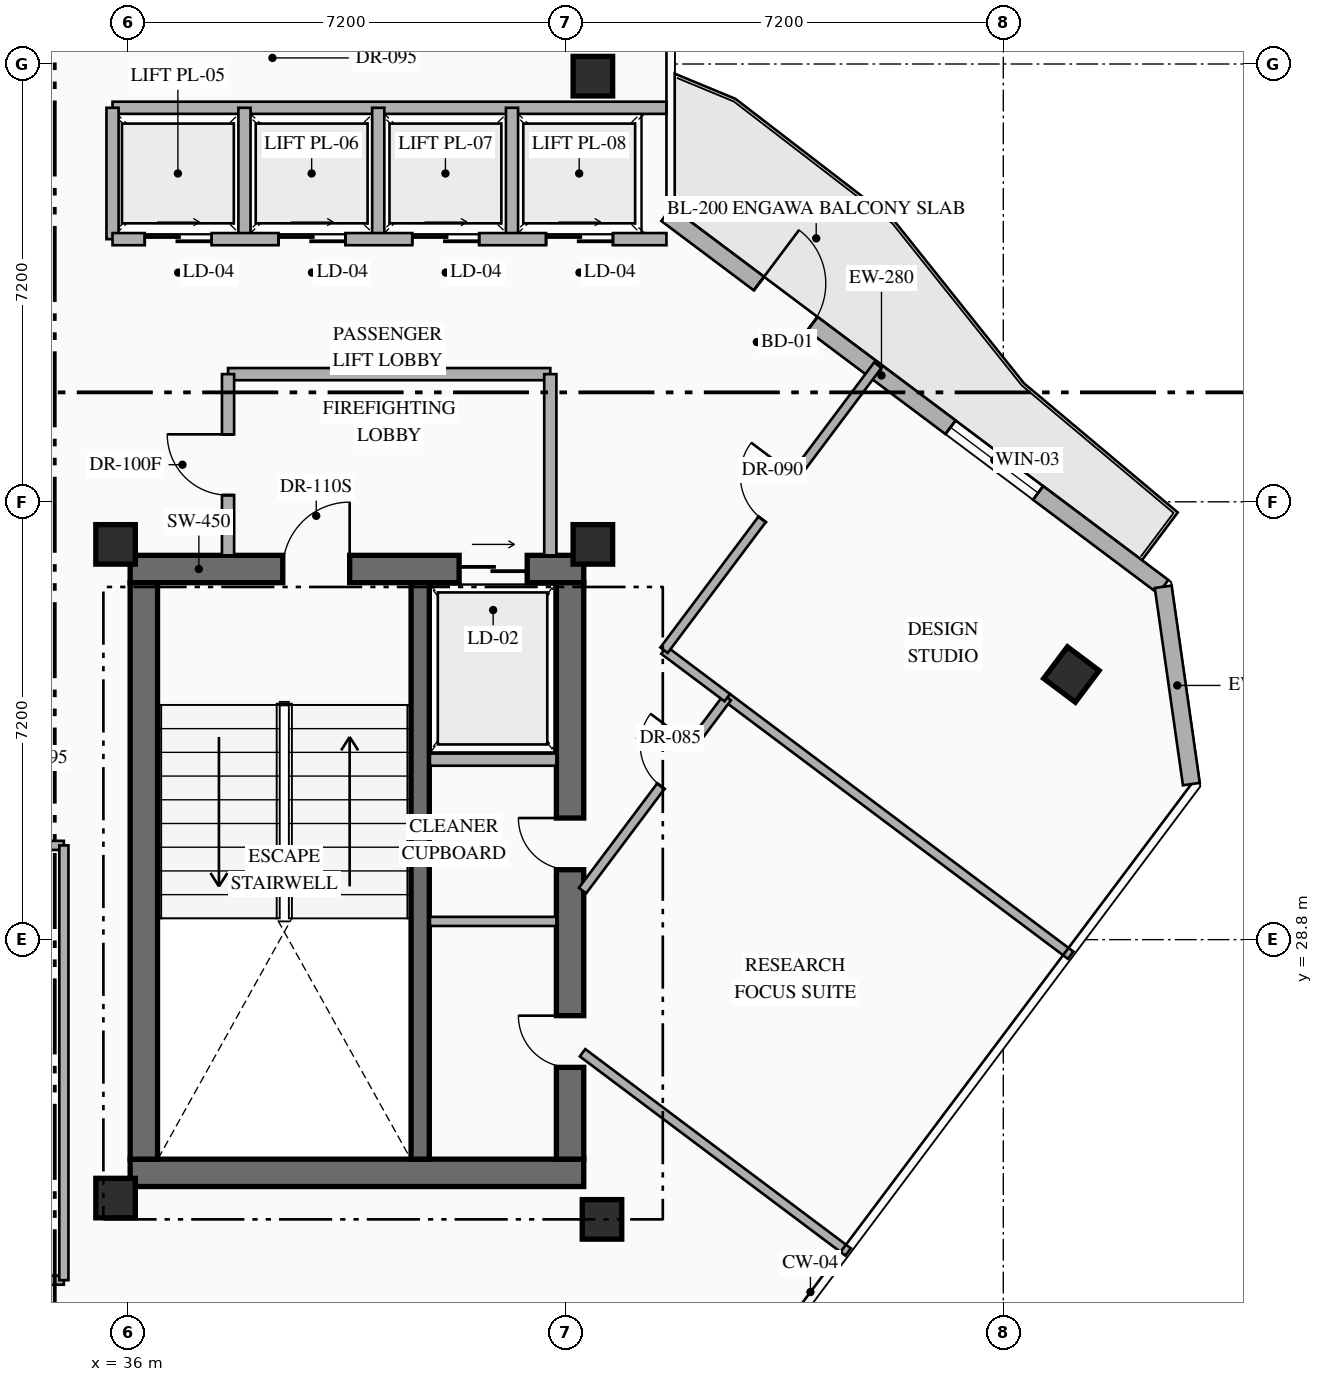
"""IFC4 building model, lengths in metres.
Left out: names, types, materials, properties, quantities, classifications, styles, units other than length and angle.
Written with IfcOpenShell. Run it as: python <this file> out.ifc"""

import sys

from ifc_helpers import new_model, si_unit, direction, frame, frame_2d, origin, origin_2d, place, context, subcontext, project, spatial, rectangle, hollow_rectangle, extrude, element, fill, save


model = new_model("IFC4")
c1 = context("Model", 3, precision=1e-05, world=origin(), true_north=direction((0.0, 1.0)))
c2 = subcontext(c1, "Body", "Model", "MODEL_VIEW")
j1 = project(units=[si_unit("LENGTHUNIT", "METRE"), si_unit("PLANEANGLEUNIT", "RADIAN")], contexts=[c1])
p1 = place(None, origin())
s1 = spatial("IfcSite", under=j1, at=p1, CompositionType="ELEMENT")
p2 = place(p1, origin())
s2 = spatial("IfcBuilding", under=s1, at=p2, CompositionType="ELEMENT")
p3 = place(p2, frame((0.0, 0.0, 243.15)))
s3 = spatial("IfcBuildingStorey", under=s2, at=p3, CompositionType="ELEMENT", Elevation=243.15)
p4 = place(p3, frame((36.04, 24.965, 0.0), z_axis=(0.0, 0.0, 1.0), x_axis=(1.0, 0.0, 0.0)))
e1 = element("IfcWall", 1, at=p4, inside=s3, PredefinedType="SHEAR", context=c2, shape_type="SweptSolid", body=[
    extrude(rectangle(XDim=7.46, YDim=0.45, at=frame_2d((3.73, 0.0))), origin(), (0.0, 0.0, 1.0), 3.6),
])
p5 = place(p3, frame((36.04, 34.895, 0.0), z_axis=(0.0, 0.0, 1.0), x_axis=(1.0, 0.0, 0.0)))
e2 = element("IfcWall", 2, at=p5, inside=s3, PredefinedType="SHEAR", context=c2, shape_type="SweptSolid", body=[
    extrude(rectangle(XDim=7.46, YDim=0.45, at=frame_2d((3.73, 0.0))), origin(), (0.0, 0.0, 1.0), 3.6),
])
p6 = place(p5, frame((2.51, 0.0, 0.0)))
e3 = element("IfcOpeningElement", 3, at=p6, cuts=e2, PredefinedType="OPENING", context=c2, shape_type="SweptSolid", body=[
    extrude(rectangle(XDim=1.1, YDim=2.2, at=frame_2d((0.55, 1.1))), frame((0.0, 0.235, 0.0), z_axis=(0.0, -1.0, 0.0), x_axis=(1.0, 0.0, 0.0)), (0.0, 0.0, 1.0), 0.47),
])
p7 = place(p5, frame((5.41, 0.0, 0.0)))
e4 = element("IfcOpeningElement", 4, at=p7, cuts=e2, PredefinedType="OPENING", context=c2, shape_type="SweptSolid", body=[
    extrude(rectangle(XDim=1.12, YDim=2.15, at=frame_2d((0.56, 1.075))), frame((0.0, 0.235, 0.0), z_axis=(0.0, -1.0, 0.0), x_axis=(1.0, 0.0, 0.0)), (0.0, 0.0, 1.0), 0.47),
])
p8 = place(p3, frame((36.265, 25.19, 0.0), z_axis=(0.0, 0.0, 1.0), x_axis=(0.0, 1.0, 0.0)))
e5 = element("IfcWall", 5, at=p8, inside=s3, PredefinedType="SHEAR", context=c2, shape_type="SweptSolid", body=[
    extrude(rectangle(XDim=9.48, YDim=0.45, at=frame_2d((4.74, 0.0))), origin(), (0.0, 0.0, 1.0), 3.6),
])
p9 = place(p3, frame((43.275, 25.19, 0.0), z_axis=(0.0, 0.0, 1.0), x_axis=(0.0, 1.0, 0.0)))
e6 = element("IfcWall", 6, at=p9, inside=s3, PredefinedType="SHEAR", context=c2, shape_type="SweptSolid", body=[
    extrude(rectangle(XDim=9.48, YDim=0.45, at=frame_2d((4.74, 0.0))), origin(), (0.0, 0.0, 1.0), 3.6),
])
p10 = place(p9, frame((1.51, 0.0, 0.0)))
e7 = element("IfcOpeningElement", 7, at=p10, cuts=e6, PredefinedType="OPENING", context=c2, shape_type="SweptSolid", body=[
    extrude(rectangle(XDim=0.85, YDim=2.08, at=frame_2d((0.425, 1.04))), frame((0.0, 0.235, 0.0), z_axis=(0.0, -1.0, 0.0), x_axis=(1.0, 0.0, 0.0)), (0.0, 0.0, 1.0), 0.47),
])
p11 = place(p9, frame((4.76, 0.0, 0.0)))
e8 = element("IfcOpeningElement", 8, at=p11, cuts=e6, PredefinedType="OPENING", context=c2, shape_type="SweptSolid", body=[
    extrude(rectangle(XDim=0.85, YDim=2.08, at=frame_2d((0.425, 1.04))), frame((0.0, 0.235, 0.0), z_axis=(0.0, -1.0, 0.0), x_axis=(1.0, 0.0, 0.0)), (0.0, 0.0, 1.0), 0.47),
])
p12 = place(p3, frame((40.81, 25.19, 0.0), z_axis=(0.0, 0.0, 1.0), x_axis=(0.0, 1.0, 0.0)))
e9 = element("IfcWall", 9, at=p12, inside=s3, PredefinedType="SHEAR", context=c2, shape_type="SweptSolid", body=[
    extrude(rectangle(XDim=9.48, YDim=0.3, at=frame_2d((4.74, 0.0))), origin(), (0.0, 0.0, 1.0), 3.6),
])
for number, where, z_axis, x_axis in (
    (10, (35.8, 24.55, 0.0), (0.0, 0.0, 1.0), (1.0, 0.0, 0.0)),
    (11, (43.8, 24.2, 0.0), (0.0, 0.0, 1.0), (1.0, 0.0, 0.0)),
    (12, (35.8, 35.3, 0.0), (0.0, 0.0, 1.0), (1.0, 0.0, 0.0)),
    (13, (43.65, 35.3, 0.0), (0.0, 0.0, 1.0), (1.0, 0.0, 0.0)),
    (14, (43.65, 43.0, 0.0), (0.0, 0.0, 1.0), (1.0, 0.0, 0.0)),
    (15, (51.52, 33.16, 0.0), (0.0, 0.0, 1.0), (0.8, -0.6, 0.0)),
):
    element("IfcColumn", number, at=place(p3, frame(where, z_axis=z_axis, x_axis=x_axis)), inside=s3, PredefinedType="COLUMN", context=c2, shape_type="SweptSolid", body=[
        extrude(hollow_rectangle(XDim=0.65, YDim=0.65, WallThickness=0.025, at=origin_2d()), origin(), (0.0, 0.0, 1.0), 3.6),
    ])
p13 = place(p3, frame((44.86, 40.73, 0.0), z_axis=(0.0, 0.0, 1.0), x_axis=(0.800022950109, -0.599969398635, 0.0)))
e16 = element("IfcWall", 16, at=p13, inside=s3, PredefinedType="STANDARD", context=c2, shape_type="SweptSolid", body=[
    extrude(rectangle(XDim=10.212, YDim=0.28, at=frame_2d((5.106, 0.0))), origin(), (0.0, 0.0, 1.0), 3.35),
])
p14 = place(p13, frame((1.901, 0.0, 0.0)))
e17 = element("IfcOpeningElement", 17, at=p14, cuts=e16, PredefinedType="OPENING", context=c2, shape_type="SweptSolid", body=[
    extrude(rectangle(XDim=1.1, YDim=2.2, at=frame_2d((0.55, 1.1))), frame((0.0, 0.15, 0.0), z_axis=(0.0, -1.0, 0.0), x_axis=(1.0, 0.0, 0.0)), (0.0, 0.0, 1.0), 0.3),
])
p15 = place(p13, frame((5.84, 0.0, 0.85)))
e18 = element("IfcOpeningElement", 18, at=p15, cuts=e16, PredefinedType="OPENING", context=c2, shape_type="SweptSolid", body=[
    extrude(rectangle(XDim=1.8, YDim=2.1, at=frame_2d((0.9, 1.05))), frame((0.0, 0.15, 0.0), z_axis=(0.0, -1.0, 0.0), x_axis=(1.0, 0.0, 0.0)), (0.0, 0.0, 1.0), 0.3),
])
p16 = place(p3, frame((53.03, 34.603, 0.0), z_axis=(0.0, 0.0, 1.0), x_axis=(0.141212810973, -0.989979263428, 0.0)))
e19 = element("IfcWall", 19, at=p16, inside=s3, PredefinedType="STANDARD", context=c2, shape_type="SweptSolid", body=[
    extrude(rectangle(XDim=3.278, YDim=0.28, at=frame_2d((1.639, 0.0))), origin(), (0.0, 0.0, 1.0), 3.35),
])
p17 = place(p3, frame((40.97, 31.76, 0.0), z_axis=(0.0, 0.0, 1.0), x_axis=(1.0, 0.0, 0.0)))
e20 = element("IfcWall", 20, at=p17, inside=s3, PredefinedType="STANDARD", context=c2, shape_type="SweptSolid", body=[
    extrude(rectangle(XDim=2.08, YDim=0.2, at=frame_2d((1.04, 0.0))), origin(), (0.0, 0.0, 1.0), 3.35),
])
p18 = place(p3, frame((40.97, 29.1, 0.0), z_axis=(0.0, 0.0, 1.0), x_axis=(1.0, 0.0, 0.0)))
e21 = element("IfcWall", 21, at=p18, inside=s3, PredefinedType="PARTITIONING", context=c2, shape_type="SweptSolid", body=[
    extrude(rectangle(XDim=2.08, YDim=0.15, at=frame_2d((1.04, 0.0))), origin(), (0.0, 0.0, 1.0), 3.35),
])
p19 = place(p3, frame((37.65, 38.1, 0.0), z_axis=(0.0, 0.0, 1.0), x_axis=(1.0, 0.0, 0.0)))
e22 = element("IfcWall", 22, at=p19, inside=s3, PredefinedType="STANDARD", context=c2, shape_type="SweptSolid", body=[
    extrude(rectangle(XDim=5.3, YDim=0.2, at=frame_2d((2.65, 0.0))), origin(), (0.0, 0.0, 1.0), 3.35),
])
p20 = place(p3, frame((42.95, 35.12, 0.0), z_axis=(0.0, 0.0, 1.0), x_axis=(0.0, 1.0, 0.0)))
e23 = element("IfcWall", 23, at=p20, inside=s3, PredefinedType="STANDARD", context=c2, shape_type="SweptSolid", body=[
    extrude(rectangle(XDim=2.98, YDim=0.2, at=frame_2d((1.49, 0.0))), origin(), (0.0, 0.0, 1.0), 3.35),
])
p21 = place(p3, frame((37.65, 35.12, 0.0), z_axis=(0.0, 0.0, 1.0), x_axis=(0.0, 1.0, 0.0)))
e24 = element("IfcWall", 24, at=p21, inside=s3, PredefinedType="STANDARD", context=c2, shape_type="SweptSolid", body=[
    extrude(rectangle(XDim=2.98, YDim=0.2, at=frame_2d((1.49, 0.0))), origin(), (0.0, 0.0, 1.0), 3.35),
])
p22 = place(p21, frame((0.99, 0.0, 0.0)))
e25 = element("IfcOpeningElement", 25, at=p22, cuts=e24, PredefinedType="OPENING", context=c2, shape_type="SweptSolid", body=[
    extrude(rectangle(XDim=1.0, YDim=2.2, at=frame_2d((0.5, 1.1))), frame((0.0, 0.11, 0.0), z_axis=(0.0, -1.0, 0.0), x_axis=(1.0, 0.0, 0.0)), (0.0, 0.0, 1.0), 0.22),
])
p23 = place(p3, frame((35.75, 42.48, 0.0), z_axis=(0.0, 0.0, 1.0), x_axis=(1.0, 0.0, 0.0)))
e26 = element("IfcWall", 26, at=p23, inside=s3, PredefinedType="STANDARD", context=c2, shape_type="SweptSolid", body=[
    extrude(rectangle(XDim=9.11, YDim=0.2, at=frame_2d((4.555, 0.0))), origin(), (0.0, 0.0, 1.0), 3.35),
])
for number, where, z_axis, x_axis in (
    (27, (35.75, 40.32, 0.0), (0.0, 0.0, 1.0), (0.0, 1.0, 0.0)),
    (28, (37.92, 40.32, 0.0), (0.0, 0.0, 1.0), (0.0, 1.0, 0.0)),
    (29, (40.12, 40.32, 0.0), (0.0, 0.0, 1.0), (0.0, 1.0, 0.0)),
    (30, (42.32, 40.32, 0.0), (0.0, 0.0, 1.0), (0.0, 1.0, 0.0)),
):
    element("IfcWall", number, at=place(p3, frame(where, z_axis=z_axis, x_axis=x_axis)), inside=s3, PredefinedType="STANDARD", context=c2, shape_type="SweptSolid", body=[
        extrude(rectangle(XDim=2.16, YDim=0.2, at=frame_2d((1.08, 0.0))), origin(), (0.0, 0.0, 1.0), 3.35),
    ])
p24 = place(p3, frame((35.75, 40.32, 0.0), z_axis=(0.0, 0.0, 1.0), x_axis=(1.0, 0.0, 0.0)))
e31 = element("IfcWall", 31, at=p24, inside=s3, PredefinedType="STANDARD", context=c2, shape_type="SweptSolid", body=[
    extrude(rectangle(XDim=9.11, YDim=0.2, at=frame_2d((4.555, 0.0))), origin(), (0.0, 0.0, 1.0), 3.35),
])
p25 = place(p24, frame((0.53, 0.0, 0.0)))
e32 = element("IfcOpeningElement", 32, at=p25, cuts=e31, PredefinedType="OPENING", context=c2, shape_type="SweptSolid", body=[
    extrude(rectangle(XDim=1.1, YDim=2.18, at=frame_2d((0.55, 1.09))), frame((0.0, 0.11, 0.0), z_axis=(0.0, -1.0, 0.0), x_axis=(1.0, 0.0, 0.0)), (0.0, 0.0, 1.0), 0.22),
])
p26 = place(p24, frame((2.73, 0.0, 0.0)))
e33 = element("IfcOpeningElement", 33, at=p26, cuts=e31, PredefinedType="OPENING", context=c2, shape_type="SweptSolid", body=[
    extrude(rectangle(XDim=1.1, YDim=2.18, at=frame_2d((0.55, 1.09))), frame((0.0, 0.11, 0.0), z_axis=(0.0, -1.0, 0.0), x_axis=(1.0, 0.0, 0.0)), (0.0, 0.0, 1.0), 0.22),
])
p27 = place(p24, frame((4.93, 0.0, 0.0)))
e34 = element("IfcOpeningElement", 34, at=p27, cuts=e31, PredefinedType="OPENING", context=c2, shape_type="SweptSolid", body=[
    extrude(rectangle(XDim=1.1, YDim=2.18, at=frame_2d((0.55, 1.09))), frame((0.0, 0.11, 0.0), z_axis=(0.0, -1.0, 0.0), x_axis=(1.0, 0.0, 0.0)), (0.0, 0.0, 1.0), 0.22),
])
p28 = place(p24, frame((7.13, 0.0, 0.0)))
e35 = element("IfcOpeningElement", 35, at=p28, cuts=e31, PredefinedType="OPENING", context=c2, shape_type="SweptSolid", body=[
    extrude(rectangle(XDim=1.1, YDim=2.18, at=frame_2d((0.55, 1.09))), frame((0.0, 0.11, 0.0), z_axis=(0.0, -1.0, 0.0), x_axis=(1.0, 0.0, 0.0)), (0.0, 0.0, 1.0), 0.22),
])
p29 = place(p3, frame((30.5, 23.2, 0.0), z_axis=(0.0, 0.0, 1.0), x_axis=(1.0, 0.0, 0.0)))
e36 = element("IfcWall", 36, at=p29, inside=s3, PredefinedType="PARTITIONING", context=c2, shape_type="SweptSolid", body=[
    extrude(rectangle(XDim=4.45, YDim=0.15, at=frame_2d((2.225, 0.0))), origin(), (0.0, 0.0, 1.0), 3.35),
])
p30 = place(p3, frame((30.5, 30.35, 0.0), z_axis=(0.0, 0.0, 1.0), x_axis=(1.0, 0.0, 0.0)))
e37 = element("IfcWall", 37, at=p30, inside=s3, PredefinedType="PARTITIONING", context=c2, shape_type="SweptSolid", body=[
    extrude(rectangle(XDim=4.45, YDim=0.15, at=frame_2d((2.225, 0.0))), origin(), (0.0, 0.0, 1.0), 3.35),
])
p31 = place(p30, frame((2.846, 0.0, 0.0)))
e38 = element("IfcOpeningElement", 38, at=p31, cuts=e37, PredefinedType="OPENING", context=c2, shape_type="SweptSolid", body=[
    extrude(rectangle(XDim=0.95, YDim=2.15, at=frame_2d((0.475, 1.075))), frame((0.0, 0.085, 0.0), z_axis=(0.0, -1.0, 0.0), x_axis=(1.0, 0.0, 0.0)), (0.0, 0.0, 1.0), 0.17),
])
p32 = place(p3, frame((34.95, 23.2, 0.0), z_axis=(0.0, 0.0, 1.0), x_axis=(0.0, 1.0, 0.0)))
e39 = element("IfcWall", 39, at=p32, inside=s3, PredefinedType="PARTITIONING", context=c2, shape_type="SweptSolid", body=[
    extrude(rectangle(XDim=7.15, YDim=0.15, at=frame_2d((3.575, 0.0))), origin(), (0.0, 0.0, 1.0), 3.35),
])
p33 = place(p3, frame((43.48, 26.94, 0.0), z_axis=(0.0, 0.0, 1.0), x_axis=(0.80000536583, -0.599992845493, 0.0)))
e40 = element("IfcWall", 40, at=p33, inside=s3, PredefinedType="PARTITIONING", context=c2, shape_type="SweptSolid", body=[
    extrude(rectangle(XDim=5.46, YDim=0.15, at=frame_2d((2.73, 0.0))), origin(), (0.0, 0.0, 1.0), 3.35),
])
p34 = place(p3, frame((45.86, 32.78, 0.0), z_axis=(0.0, 0.0, 1.0), x_axis=(0.799991700537, -0.600011065791, 0.0)))
e41 = element("IfcWall", 41, at=p34, inside=s3, PredefinedType="PARTITIONING", context=c2, shape_type="SweptSolid", body=[
    extrude(rectangle(XDim=7.06, YDim=0.15, at=frame_2d((3.53, 0.0))), origin(), (0.0, 0.0, 1.0), 3.35),
])
p35 = place(p3, frame((43.48, 29.607, 0.0), z_axis=(0.0, 0.0, 1.0), x_axis=(0.600049238723, 0.79996306859, 0.0)))
e42 = element("IfcWall", 42, at=p35, inside=s3, PredefinedType="PARTITIONING", context=c2, shape_type="SweptSolid", body=[
    extrude(rectangle(XDim=3.967, YDim=0.15, at=frame_2d((1.983, 0.0))), origin(), (0.0, 0.0, 1.0), 3.35),
])
p36 = place(p35, frame((2.147, 0.0, 0.0)))
e43 = element("IfcOpeningElement", 43, at=p36, cuts=e42, PredefinedType="OPENING", context=c2, shape_type="SweptSolid", body=[
    extrude(rectangle(XDim=0.85, YDim=2.08, at=frame_2d((0.425, 1.04))), frame((0.0, 0.085, 0.0), z_axis=(0.0, -1.0, 0.0), x_axis=(1.0, 0.0, 0.0)), (0.0, 0.0, 1.0), 0.17),
])
p37 = place(p3, frame((44.82, 33.56, 0.0), z_axis=(0.0, 0.0, 1.0), x_axis=(0.8, -0.6, 0.0)))
e44 = element("IfcWall", 44, at=p37, inside=s3, PredefinedType="PARTITIONING", context=c2, shape_type="SweptSolid", body=[
    extrude(rectangle(XDim=1.3, YDim=0.15, at=frame_2d((0.65, 0.0))), origin(), (0.0, 0.0, 1.0), 3.35),
])
p38 = place(p3, frame((44.82, 33.56, 0.0), z_axis=(0.0, 0.0, 1.0), x_axis=(0.599986667805, 0.800009998972, 0.0)))
e45 = element("IfcWall", 45, at=p38, inside=s3, PredefinedType="PARTITIONING", context=c2, shape_type="SweptSolid", body=[
    extrude(rectangle(XDim=5.86, YDim=0.15, at=frame_2d((2.93, 0.0))), origin(), (0.0, 0.0, 1.0), 3.35),
])
p39 = place(p38, frame((2.69, 0.0, 0.0)))
e46 = element("IfcOpeningElement", 46, at=p39, cuts=e45, PredefinedType="OPENING", context=c2, shape_type="SweptSolid", body=[
    extrude(rectangle(XDim=0.9, YDim=2.15, at=frame_2d((0.45, 1.075))), frame((0.0, 0.085, 0.0), z_axis=(0.0, -1.0, 0.0), x_axis=(1.0, 0.0, 0.0)), (0.0, 0.0, 1.0), 0.17),
])
p40 = place(p3, frame((27.91, 26.68, 0.0), z_axis=(0.0, 0.0, 1.0), x_axis=(0.8, -0.6, 0.0)))
e47 = element("IfcWall", 47, at=p40, inside=s3, PredefinedType="PARTITIONING", context=c2, shape_type="SweptSolid", body=[
    extrude(rectangle(XDim=17.76, YDim=0.15, at=frame_2d((8.88, 0.0))), origin(), (0.0, 0.0, 1.0), 3.35),
])
p41 = place(p40, frame((11.294, 0.0, 0.0)))
e48 = element("IfcOpeningElement", 48, at=p41, cuts=e47, PredefinedType="OPENING", context=c2, shape_type="SweptSolid", body=[
    extrude(rectangle(XDim=0.95, YDim=2.15, at=frame_2d((0.475, 1.075))), frame((0.0, 0.085, 0.0), z_axis=(0.0, -1.0, 0.0), x_axis=(1.0, 0.0, 0.0)), (0.0, 0.0, 1.0), 0.17),
])
p42 = place(p14, origin())
e49 = element("IfcDoor", 49, at=p42, inside=s3, OperationType="SINGLE_SWING_LEFT", PredefinedType="DOOR", context=c2, shape_type="SweptSolid", body=[
    extrude(rectangle(XDim=1.1, YDim=2.2, at=frame_2d((0.55, 1.1))), frame((0.0, 0.025, 0.0), z_axis=(0.0, -1.0, 0.0), x_axis=(1.0, 0.0, 0.0)), (0.0, 0.0, 1.0), 0.05),
])
fill(e17, e49)
p43 = place(p15, origin())
e50 = element("IfcWindow", 50, at=p43, inside=s3, PartitioningType="SINGLE_PANEL", PredefinedType="WINDOW", context=c2, shape_type="SweptSolid", body=[
    extrude(rectangle(XDim=1.8, YDim=2.1, at=frame_2d((0.9, 1.05))), frame((0.0, 0.03, 0.0), z_axis=(0.0, -1.0, 0.0), x_axis=(1.0, 0.0, 0.0)), (0.0, 0.0, 1.0), 0.06),
])
fill(e18, e50)
p44 = place(p6, origin())
e51 = element("IfcDoor", 51, at=p44, inside=s3, OperationType="SINGLE_SWING_RIGHT", PredefinedType="DOOR", context=c2, shape_type="SweptSolid", body=[
    extrude(rectangle(XDim=1.1, YDim=2.2, at=frame_2d((0.55, 1.1))), frame((0.0, 0.025, 0.0), z_axis=(0.0, -1.0, 0.0), x_axis=(1.0, 0.0, 0.0)), (0.0, 0.0, 1.0), 0.05),
])
fill(e3, e51)
p45 = place(p7, origin())
e52 = element("IfcDoor", 52, at=p45, inside=s3, OperationType="SLIDING_TO_RIGHT", PredefinedType="USERDEFINED", context=c2, shape_type="SweptSolid", body=[
    extrude(rectangle(XDim=1.12, YDim=2.15, at=frame_2d((0.56, 1.075))), frame((0.0, 0.025, 0.0), z_axis=(0.0, -1.0, 0.0), x_axis=(1.0, 0.0, 0.0)), (0.0, 0.0, 1.0), 0.05),
])
fill(e4, e52)
p46 = place(p10, origin())
e53 = element("IfcDoor", 53, at=p46, inside=s3, OperationType="SINGLE_SWING_RIGHT", PredefinedType="DOOR", context=c2, shape_type="SweptSolid", body=[
    extrude(rectangle(XDim=0.85, YDim=2.08, at=frame_2d((0.425, 1.04))), frame((0.0, 0.025, 0.0), z_axis=(0.0, -1.0, 0.0), x_axis=(1.0, 0.0, 0.0)), (0.0, 0.0, 1.0), 0.05),
])
fill(e7, e53)
p47 = place(p11, origin())
e54 = element("IfcDoor", 54, at=p47, inside=s3, OperationType="SINGLE_SWING_RIGHT", PredefinedType="DOOR", context=c2, shape_type="SweptSolid", body=[
    extrude(rectangle(XDim=0.85, YDim=2.08, at=frame_2d((0.425, 1.04))), frame((0.0, 0.025, 0.0), z_axis=(0.0, -1.0, 0.0), x_axis=(1.0, 0.0, 0.0)), (0.0, 0.0, 1.0), 0.05),
])
fill(e8, e54)
p48 = place(p22, origin())
e55 = element("IfcDoor", 55, at=p48, inside=s3, OperationType="SINGLE_SWING_RIGHT", PredefinedType="DOOR", context=c2, shape_type="SweptSolid", body=[
    extrude(rectangle(XDim=1.0, YDim=2.2, at=frame_2d((0.5, 1.1))), frame((0.0, 0.025, 0.0), z_axis=(0.0, -1.0, 0.0), x_axis=(1.0, 0.0, 0.0)), (0.0, 0.0, 1.0), 0.05),
])
fill(e25, e55)
p49 = place(p25, origin())
e56 = element("IfcDoor", 56, at=p49, inside=s3, OperationType="SLIDING_TO_RIGHT", PredefinedType="USERDEFINED", context=c2, shape_type="SweptSolid", body=[
    extrude(rectangle(XDim=1.1, YDim=2.18, at=frame_2d((0.55, 1.09))), frame((0.0, 0.025, 0.0), z_axis=(0.0, -1.0, 0.0), x_axis=(1.0, 0.0, 0.0)), (0.0, 0.0, 1.0), 0.05),
])
fill(e32, e56)
p50 = place(p26, origin())
e57 = element("IfcDoor", 57, at=p50, inside=s3, OperationType="SLIDING_TO_RIGHT", PredefinedType="USERDEFINED", context=c2, shape_type="SweptSolid", body=[
    extrude(rectangle(XDim=1.1, YDim=2.18, at=frame_2d((0.55, 1.09))), frame((0.0, 0.025, 0.0), z_axis=(0.0, -1.0, 0.0), x_axis=(1.0, 0.0, 0.0)), (0.0, 0.0, 1.0), 0.05),
])
fill(e33, e57)
p51 = place(p27, origin())
e58 = element("IfcDoor", 58, at=p51, inside=s3, OperationType="SLIDING_TO_RIGHT", PredefinedType="USERDEFINED", context=c2, shape_type="SweptSolid", body=[
    extrude(rectangle(XDim=1.1, YDim=2.18, at=frame_2d((0.55, 1.09))), frame((0.0, 0.025, 0.0), z_axis=(0.0, -1.0, 0.0), x_axis=(1.0, 0.0, 0.0)), (0.0, 0.0, 1.0), 0.05),
])
fill(e34, e58)
p52 = place(p28, origin())
e59 = element("IfcDoor", 59, at=p52, inside=s3, OperationType="SLIDING_TO_RIGHT", PredefinedType="USERDEFINED", context=c2, shape_type="SweptSolid", body=[
    extrude(rectangle(XDim=1.1, YDim=2.18, at=frame_2d((0.55, 1.09))), frame((0.0, 0.025, 0.0), z_axis=(0.0, -1.0, 0.0), x_axis=(1.0, 0.0, 0.0)), (0.0, 0.0, 1.0), 0.05),
])
fill(e35, e59)
p53 = place(p36, origin())
e60 = element("IfcDoor", 60, at=p53, inside=s3, OperationType="SINGLE_SWING_RIGHT", PredefinedType="DOOR", context=c2, shape_type="SweptSolid", body=[
    extrude(rectangle(XDim=0.85, YDim=2.08, at=frame_2d((0.425, 1.04))), frame((0.0, 0.025, 0.0), z_axis=(0.0, -1.0, 0.0), x_axis=(1.0, 0.0, 0.0)), (0.0, 0.0, 1.0), 0.05),
])
fill(e43, e60)
p54 = place(p39, origin())
e61 = element("IfcDoor", 61, at=p54, inside=s3, OperationType="SINGLE_SWING_RIGHT", PredefinedType="DOOR", context=c2, shape_type="SweptSolid", body=[
    extrude(rectangle(XDim=0.9, YDim=2.15, at=frame_2d((0.45, 1.075))), frame((0.0, 0.025, 0.0), z_axis=(0.0, -1.0, 0.0), x_axis=(1.0, 0.0, 0.0)), (0.0, 0.0, 1.0), 0.05),
])
fill(e46, e61)
save(model, sys.argv[1])
